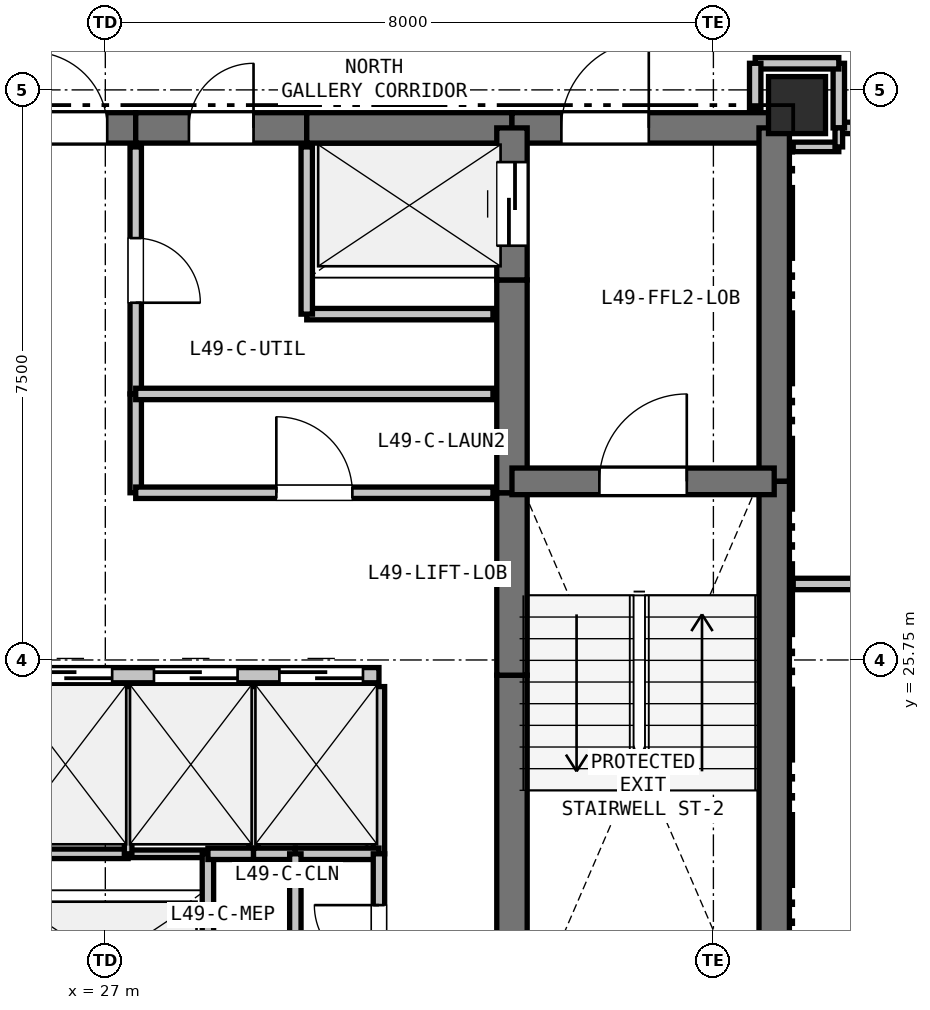
"""IFC4 building model, lengths in metres.
Left out: names, types, materials, properties, quantities, classifications, styles, units other than length and angle.
Written with IfcOpenShell. Run it as: python <this file> out.ifc"""

import sys

from ifc_helpers import new_model, si_unit, direction, frame, frame_2d, origin, origin_2d, place, context, subcontext, project, spatial, rectangle, extrude, element, fill, save


model = new_model("IFC4")
c1 = context("Model", 3, precision=1e-05, world=origin(), true_north=direction((0.0, 1.0)))
c2 = subcontext(c1, "Body", "Model", "MODEL_VIEW")
j1 = project(units=[si_unit("LENGTHUNIT", "METRE"), si_unit("PLANEANGLEUNIT", "RADIAN")], contexts=[c1])
p1 = place(None, origin())
s1 = spatial("IfcSite", under=j1, at=p1, CompositionType="ELEMENT")
p2 = place(p1, origin())
s2 = spatial("IfcBuilding", under=s1, at=p2, CompositionType="ELEMENT")
p3 = place(p2, frame((0.0, 0.0, 178.8)))
s3 = spatial("IfcBuildingStorey", under=s2, at=p3, CompositionType="ELEMENT", Elevation=178.8)
p4 = place(p3, frame((36.1, 33.05, 0.0), z_axis=(0.0, 0.0, 1.0), x_axis=(1.0, 0.0, 0.0)))
e1 = element("IfcColumn", 1, at=p4, inside=s3, PredefinedType="COLUMN", context=c2, shape_type="SweptSolid", body=[
    extrude(rectangle(XDim=0.75, YDim=0.75, at=origin_2d()), origin(), (0.0, 0.0, 1.0), 3.3),
])
p5 = place(p3, frame((25.65, 32.75, 0.0), z_axis=(0.0, 0.0, 1.0), x_axis=(1.0, 0.0, 0.0)))
e2 = element("IfcWall", 2, at=p5, inside=s3, PredefinedType="SHEAR", context=c2, shape_type="SweptSolid", body=[
    extrude(rectangle(XDim=1.75, YDim=0.4, at=frame_2d((0.875, 0.0))), origin(), (0.0, 0.0, 1.0), 3.07),
])
p6 = place(p5, frame((0.375, 0.0, 0.0)))
e3 = element("IfcOpeningElement", 3, at=p6, cuts=e2, PredefinedType="OPENING", context=c2, shape_type="SweptSolid", body=[
    extrude(rectangle(XDim=1.0, YDim=2.15, at=frame_2d((0.5, 1.075))), frame((0.0, 0.21, 0.0), z_axis=(0.0, -1.0, 0.0), x_axis=(1.0, 0.0, 0.0)), (0.0, 0.0, 1.0), 0.42),
])
p7 = place(p3, frame((27.4, 32.75, 0.0), z_axis=(0.0, 0.0, 1.0), x_axis=(1.0, 0.0, 0.0)))
e4 = element("IfcWall", 4, at=p7, inside=s3, PredefinedType="SHEAR", context=c2, shape_type="SweptSolid", body=[
    extrude(rectangle(XDim=2.25, YDim=0.4, at=frame_2d((1.125, 0.0))), origin(), (0.0, 0.0, 1.0), 3.07),
])
p8 = place(p7, frame((0.7, 0.0, 0.0)))
e5 = element("IfcOpeningElement", 5, at=p8, cuts=e4, PredefinedType="OPENING", context=c2, shape_type="SweptSolid", body=[
    extrude(rectangle(XDim=0.85, YDim=2.1, at=frame_2d((0.425, 1.05))), frame((0.0, 0.21, 0.0), z_axis=(0.0, -1.0, 0.0), x_axis=(1.0, 0.0, 0.0)), (0.0, 0.0, 1.0), 0.42),
])
p9 = place(p3, frame((29.65, 32.75, 0.0), z_axis=(0.0, 0.0, 1.0), x_axis=(1.0, 0.0, 0.0)))
e6 = element("IfcWall", 6, at=p9, inside=s3, PredefinedType="SHEAR", context=c2, shape_type="SweptSolid", body=[
    extrude(rectangle(XDim=2.7, YDim=0.4, at=frame_2d((1.35, 0.0))), origin(), (0.0, 0.0, 1.0), 3.07),
])
p10 = place(p3, frame((32.35, 32.75, 0.0), z_axis=(0.0, 0.0, 1.0), x_axis=(1.0, 0.0, 0.0)))
e7 = element("IfcWall", 7, at=p10, inside=s3, PredefinedType="SHEAR", context=c2, shape_type="SweptSolid", body=[
    extrude(rectangle(XDim=3.45, YDim=0.4, at=frame_2d((1.725, 0.0))), origin(), (0.0, 0.0, 1.0), 3.07),
])
p11 = place(p10, frame((0.65, 0.0, 0.0)))
e8 = element("IfcOpeningElement", 8, at=p11, cuts=e7, PredefinedType="OPENING", context=c2, shape_type="SweptSolid", body=[
    extrude(rectangle(XDim=1.15, YDim=2.15, at=frame_2d((0.575, 1.075))), frame((0.0, 0.21, 0.0), z_axis=(0.0, -1.0, 0.0), x_axis=(1.0, 0.0, 0.0)), (0.0, 0.0, 1.0), 0.42),
])
p12 = place(p3, frame((35.8, 32.75, 0.0), z_axis=(0.0, 0.0, 1.0), x_axis=(0.0, -1.0, 0.0)))
e9 = element("IfcWall", 9, at=p12, inside=s3, PredefinedType="SHEAR", context=c2, shape_type="SweptSolid", body=[
    extrude(rectangle(XDim=4.65, YDim=0.4, at=frame_2d((2.325, 0.0))), origin(), (0.0, 0.0, 1.0), 3.07),
])
p13 = place(p3, frame((35.8, 28.1, 0.0), z_axis=(0.0, 0.0, 1.0), x_axis=(0.0, -1.0, 0.0)))
e10 = element("IfcWall", 10, at=p13, inside=s3, PredefinedType="SHEAR", context=c2, shape_type="SweptSolid", body=[
    extrude(rectangle(XDim=7.35, YDim=0.4, at=frame_2d((3.675, 0.0))), origin(), (0.0, 0.0, 1.0), 3.07),
])
p14 = place(p3, frame((32.35, 20.75, 0.0), z_axis=(0.0, 0.0, 1.0), x_axis=(0.0, 1.0, 0.0)))
e11 = element("IfcWall", 11, at=p14, inside=s3, PredefinedType="SHEAR", context=c2, shape_type="SweptSolid", body=[
    extrude(rectangle(XDim=4.8, YDim=0.4, at=frame_2d((2.4, 0.0))), origin(), (0.0, 0.0, 1.0), 3.07),
])
p15 = place(p3, frame((32.35, 25.55, 0.0), z_axis=(0.0, 0.0, 1.0), x_axis=(0.0, 1.0, 0.0)))
e12 = element("IfcWall", 12, at=p15, inside=s3, PredefinedType="SHEAR", context=c2, shape_type="SweptSolid", body=[
    extrude(rectangle(XDim=2.4, YDim=0.4, at=frame_2d((1.2, 0.0))), origin(), (0.0, 0.0, 1.0), 3.07),
])
p16 = place(p3, frame((32.35, 27.95, 0.0), z_axis=(0.0, 0.0, 1.0), x_axis=(0.0, 1.0, 0.0)))
e13 = element("IfcWall", 13, at=p16, inside=s3, PredefinedType="SHEAR", context=c2, shape_type="SweptSolid", body=[
    extrude(rectangle(XDim=2.8, YDim=0.4, at=frame_2d((1.4, 0.0))), origin(), (0.0, 0.0, 1.0), 3.07),
])
p17 = place(p3, frame((32.35, 30.75, 0.0), z_axis=(0.0, 0.0, 1.0), x_axis=(0.0, 1.0, 0.0)))
e14 = element("IfcWall", 14, at=p17, inside=s3, PredefinedType="SHEAR", context=c2, shape_type="SweptSolid", body=[
    extrude(rectangle(XDim=2.0, YDim=0.4, at=frame_2d((1.0, 0.0))), origin(), (0.0, 0.0, 1.0), 3.07),
])
p18 = place(p17, frame((0.45, 0.0, 0.0)))
e15 = element("IfcOpeningElement", 15, at=p18, cuts=e14, PredefinedType="OPENING", context=c2, shape_type="SweptSolid", body=[
    extrude(rectangle(XDim=1.1, YDim=2.15, at=frame_2d((0.55, 1.075))), frame((0.0, 0.21, 0.0), z_axis=(0.0, -1.0, 0.0), x_axis=(1.0, 0.0, 0.0)), (0.0, 0.0, 1.0), 0.42),
])
p19 = place(p3, frame((32.35, 28.1, 0.0), z_axis=(0.0, 0.0, 1.0), x_axis=(1.0, 0.0, 0.0)))
e16 = element("IfcWall", 16, at=p19, inside=s3, PredefinedType="SHEAR", context=c2, shape_type="SweptSolid", body=[
    extrude(rectangle(XDim=3.45, YDim=0.35, at=frame_2d((1.725, 0.0))), origin(), (0.0, 0.0, 1.0), 3.07),
])
p20 = place(p19, frame((1.15, 0.0, 0.0)))
e17 = element("IfcOpeningElement", 17, at=p20, cuts=e16, PredefinedType="OPENING", context=c2, shape_type="SweptSolid", body=[
    extrude(rectangle(XDim=1.15, YDim=2.15, at=frame_2d((0.575, 1.075))), frame((0.0, 0.185, 0.0), z_axis=(0.0, -1.0, 0.0), x_axis=(1.0, 0.0, 0.0)), (0.0, 0.0, 1.0), 0.37),
])
p21 = place(p3, frame((25.65, 25.55, 0.0), z_axis=(0.0, 0.0, 1.0), x_axis=(1.0, 0.0, 0.0)))
e18 = element("IfcWall", 18, at=p21, inside=s3, PredefinedType="PARTITIONING", context=c2, shape_type="SweptSolid", body=[
    extrude(rectangle(XDim=4.95, YDim=0.2, at=frame_2d((2.475, 0.0))), origin(), (0.0, 0.0, 1.0), 3.07),
])
p22 = place(p21, frame((0.34, 0.0, 0.0)))
e19 = element("IfcOpeningElement", 19, at=p22, cuts=e18, PredefinedType="OPENING", context=c2, shape_type="SweptSolid", body=[
    extrude(rectangle(XDim=1.1, YDim=2.15, at=frame_2d((0.55, 1.075))), frame((0.0, 0.11, 0.0), z_axis=(0.0, -1.0, 0.0), x_axis=(1.0, 0.0, 0.0)), (0.0, 0.0, 1.0), 0.22),
])
p23 = place(p21, frame((1.99, 0.0, 0.0)))
e20 = element("IfcOpeningElement", 20, at=p23, cuts=e18, PredefinedType="OPENING", context=c2, shape_type="SweptSolid", body=[
    extrude(rectangle(XDim=1.1, YDim=2.15, at=frame_2d((0.55, 1.075))), frame((0.0, 0.11, 0.0), z_axis=(0.0, -1.0, 0.0), x_axis=(1.0, 0.0, 0.0)), (0.0, 0.0, 1.0), 0.22),
])
p24 = place(p21, frame((3.64, 0.0, 0.0)))
e21 = element("IfcOpeningElement", 21, at=p24, cuts=e18, PredefinedType="OPENING", context=c2, shape_type="SweptSolid", body=[
    extrude(rectangle(XDim=1.1, YDim=2.15, at=frame_2d((0.55, 1.075))), frame((0.0, 0.11, 0.0), z_axis=(0.0, -1.0, 0.0), x_axis=(1.0, 0.0, 0.0)), (0.0, 0.0, 1.0), 0.22),
])
p25 = place(p3, frame((25.9, 23.2, 0.0), z_axis=(0.0, 0.0, 1.0), x_axis=(1.0, 0.0, 0.0)))
e22 = element("IfcWall", 22, at=p25, inside=s3, PredefinedType="PARTITIONING", context=c2, shape_type="SweptSolid", body=[
    extrude(rectangle(XDim=1.4, YDim=0.125, at=frame_2d((0.7, 0.0))), origin(), (0.0, 0.0, 1.0), 3.07),
])
p26 = place(p3, frame((27.3, 23.2, 0.0), z_axis=(0.0, 0.0, 1.0), x_axis=(1.0, 0.0, 0.0)))
e23 = element("IfcWall", 23, at=p26, inside=s3, PredefinedType="PARTITIONING", context=c2, shape_type="SweptSolid", body=[
    extrude(rectangle(XDim=1.05, YDim=0.1, at=frame_2d((0.525, 0.0))), origin(), (0.0, 0.0, 1.0), 3.07),
])
p27 = place(p3, frame((28.35, 23.2, 0.0), z_axis=(0.0, 0.0, 1.0), x_axis=(0.0, -1.0, 0.0)))
e24 = element("IfcWall", 24, at=p27, inside=s3, PredefinedType="PARTITIONING", context=c2, shape_type="SweptSolid", body=[
    extrude(rectangle(XDim=2.2, YDim=0.15, at=frame_2d((1.1, 0.0))), origin(), (0.0, 0.0, 1.0), 3.07),
])
p28 = place(p3, frame((32.1, 30.3, 0.0), z_axis=(0.0, 0.0, 1.0), x_axis=(-1.0, 0.0, 0.0)))
e25 = element("IfcWall", 25, at=p28, inside=s3, PredefinedType="PARTITIONING", context=c2, shape_type="SweptSolid", body=[
    extrude(rectangle(XDim=2.45, YDim=0.15, at=frame_2d((1.225, 0.0))), origin(), (0.0, 0.0, 1.0), 3.07),
])
p29 = place(p3, frame((29.65, 30.3, 0.0), z_axis=(0.0, 0.0, 1.0), x_axis=(0.0, 1.0, 0.0)))
e26 = element("IfcWall", 26, at=p29, inside=s3, PredefinedType="PARTITIONING", context=c2, shape_type="SweptSolid", body=[
    extrude(rectangle(XDim=2.2, YDim=0.15, at=frame_2d((1.1, 0.0))), origin(), (0.0, 0.0, 1.0), 3.07),
])
p30 = place(p3, frame((27.3, 25.4, 0.0), z_axis=(0.0, 0.0, 1.0), x_axis=(0.0, -1.0, 0.0)))
e27 = element("IfcWall", 27, at=p30, inside=s3, PredefinedType="PARTITIONING", context=c2, shape_type="SweptSolid", body=[
    extrude(rectangle(XDim=2.2, YDim=0.1, at=frame_2d((1.1, 0.0))), origin(), (0.0, 0.0, 1.0), 3.07),
])
p31 = place(p3, frame((28.95, 25.4, 0.0), z_axis=(0.0, 0.0, 1.0), x_axis=(0.0, -1.0, 0.0)))
e28 = element("IfcWall", 28, at=p31, inside=s3, PredefinedType="PARTITIONING", context=c2, shape_type="SweptSolid", body=[
    extrude(rectangle(XDim=2.2, YDim=0.125, at=frame_2d((1.1, 0.0))), origin(), (0.0, 0.0, 1.0), 3.07),
])
p32 = place(p3, frame((28.95, 23.2, 0.0), z_axis=(0.0, 0.0, 1.0), x_axis=(-1.0, 0.0, 0.0)))
e29 = element("IfcWall", 29, at=p32, inside=s3, PredefinedType="PARTITIONING", context=c2, shape_type="SweptSolid", body=[
    extrude(rectangle(XDim=0.6, YDim=0.15, at=frame_2d((0.3, 0.0))), origin(), (0.0, 0.0, 1.0), 3.07),
])
p33 = place(p3, frame((30.6, 25.4, 0.0), z_axis=(0.0, 0.0, 1.0), x_axis=(0.0, -1.0, 0.0)))
e30 = element("IfcWall", 30, at=p33, inside=s3, PredefinedType="PARTITIONING", context=c2, shape_type="SweptSolid", body=[
    extrude(rectangle(XDim=2.2, YDim=0.15, at=frame_2d((1.1, 0.0))), origin(), (0.0, 0.0, 1.0), 3.07),
])
p34 = place(p3, frame((30.6, 23.2, 0.0), z_axis=(0.0, 0.0, 1.0), x_axis=(-1.0, 0.0, 0.0)))
e31 = element("IfcWall", 31, at=p34, inside=s3, PredefinedType="PARTITIONING", context=c2, shape_type="SweptSolid", body=[
    extrude(rectangle(XDim=1.1, YDim=0.15, at=frame_2d((0.55, 0.0))), origin(), (0.0, 0.0, 1.0), 3.07),
])
p35 = place(p3, frame((29.5, 23.2, 0.0), z_axis=(0.0, 0.0, 1.0), x_axis=(-1.0, 0.0, 0.0)))
e32 = element("IfcWall", 32, at=p35, inside=s3, PredefinedType="PARTITIONING", context=c2, shape_type="SweptSolid", body=[
    extrude(rectangle(XDim=0.55, YDim=0.15, at=frame_2d((0.275, 0.0))), origin(), (0.0, 0.0, 1.0), 3.07),
])
p36 = place(p3, frame((30.6, 21.0, 0.0), z_axis=(0.0, 0.0, 1.0), x_axis=(0.0, 1.0, 0.0)))
e33 = element("IfcWall", 33, at=p36, inside=s3, PredefinedType="PARTITIONING", context=c2, shape_type="SweptSolid", body=[
    extrude(rectangle(XDim=2.2, YDim=0.15, at=frame_2d((1.1, 0.0))), origin(), (0.0, 0.0, 1.0), 3.07),
])
p37 = place(p36, frame((0.675, 0.0, 0.0)))
e34 = element("IfcOpeningElement", 34, at=p37, cuts=e33, PredefinedType="OPENING", context=c2, shape_type="SweptSolid", body=[
    extrude(rectangle(XDim=0.85, YDim=2.1, at=frame_2d((0.425, 1.05))), frame((0.0, 0.085, 0.0), z_axis=(0.0, -1.0, 0.0), x_axis=(1.0, 0.0, 0.0)), (0.0, 0.0, 1.0), 0.17),
])
p38 = place(p3, frame((27.4, 32.5, 0.0), z_axis=(0.0, 0.0, 1.0), x_axis=(0.0, -1.0, 0.0)))
e35 = element("IfcWall", 35, at=p38, inside=s3, PredefinedType="PARTITIONING", context=c2, shape_type="SweptSolid", body=[
    extrude(rectangle(XDim=3.25, YDim=0.15, at=frame_2d((1.625, 0.0))), origin(), (0.0, 0.0, 1.0), 3.07),
])
p39 = place(p38, frame((1.2, 0.0, 0.0)))
e36 = element("IfcOpeningElement", 36, at=p39, cuts=e35, PredefinedType="OPENING", context=c2, shape_type="SweptSolid", body=[
    extrude(rectangle(XDim=0.85, YDim=2.1, at=frame_2d((0.425, 1.05))), frame((0.0, 0.085, 0.0), z_axis=(0.0, -1.0, 0.0), x_axis=(1.0, 0.0, 0.0)), (0.0, 0.0, 1.0), 0.17),
])
p40 = place(p3, frame((27.4, 29.25, 0.0), z_axis=(0.0, 0.0, 1.0), x_axis=(0.0, -1.0, 0.0)))
e37 = element("IfcWall", 37, at=p40, inside=s3, PredefinedType="PARTITIONING", context=c2, shape_type="SweptSolid", body=[
    extrude(rectangle(XDim=1.3, YDim=0.15, at=frame_2d((0.65, 0.0))), origin(), (0.0, 0.0, 1.0), 3.07),
])
p41 = place(p3, frame((27.4, 27.95, 0.0), z_axis=(0.0, 0.0, 1.0), x_axis=(1.0, 0.0, 0.0)))
e38 = element("IfcWall", 38, at=p41, inside=s3, PredefinedType="PARTITIONING", context=c2, shape_type="SweptSolid", body=[
    extrude(rectangle(XDim=4.7, YDim=0.15, at=frame_2d((2.35, 0.0))), origin(), (0.0, 0.0, 1.0), 3.07),
])
p42 = place(p41, frame((1.85, 0.0, 0.0)))
e39 = element("IfcOpeningElement", 39, at=p42, cuts=e38, PredefinedType="OPENING", context=c2, shape_type="SweptSolid", body=[
    extrude(rectangle(XDim=1.0, YDim=2.15, at=frame_2d((0.5, 1.075))), frame((0.0, 0.085, 0.0), z_axis=(0.0, -1.0, 0.0), x_axis=(1.0, 0.0, 0.0)), (0.0, 0.0, 1.0), 0.17),
])
p43 = place(p3, frame((39.2, 32.75, 0.0), z_axis=(0.0, 0.0, 1.0), x_axis=(-1.0, 0.0, 0.0)))
e40 = element("IfcWall", 40, at=p43, inside=s3, PredefinedType="PARTITIONING", context=c2, shape_type="SweptSolid", body=[
    extrude(rectangle(XDim=2.55, YDim=0.15, at=frame_2d((1.275, 0.0))), origin(), (0.0, 0.0, 1.0), 3.07),
])
p44 = place(p43, frame((0.775, 0.0, 0.0)))
e41 = element("IfcOpeningElement", 41, at=p44, cuts=e40, PredefinedType="OPENING", context=c2, shape_type="SweptSolid", body=[
    extrude(rectangle(XDim=1.0, YDim=2.15, at=frame_2d((0.5, 1.075))), frame((0.0, 0.085, 0.0), z_axis=(0.0, -1.0, 0.0), x_axis=(1.0, 0.0, 0.0)), (0.0, 0.0, 1.0), 0.17),
])
p45 = place(p3, frame((36.65, 32.75, 0.0), z_axis=(0.0, 0.0, 1.0), x_axis=(0.0, 1.0, 0.0)))
e42 = element("IfcWall", 42, at=p45, inside=s3, PredefinedType="PARTITIONING", context=c2, shape_type="SweptSolid", body=[
    extrude(rectangle(XDim=0.85, YDim=0.15, at=frame_2d((0.425, 0.0))), origin(), (0.0, 0.0, 1.0), 2.518),
])
p46 = place(p3, frame((36.65, 33.6, 0.0), z_axis=(0.0, 0.0, 1.0), x_axis=(-1.0, 0.0, 0.0)))
e43 = element("IfcWall", 43, at=p46, inside=s3, PredefinedType="PARTITIONING", context=c2, shape_type="SweptSolid", body=[
    extrude(rectangle(XDim=1.1, YDim=0.15, at=frame_2d((0.55, 0.0))), origin(), (0.0, 0.0, 1.0), 2.518),
])
p47 = place(p3, frame((35.55, 33.6, 0.0), z_axis=(0.0, 0.0, 1.0), x_axis=(0.0, -1.0, 0.0)))
e44 = element("IfcWall", 44, at=p47, inside=s3, PredefinedType="PARTITIONING", context=c2, shape_type="SweptSolid", body=[
    extrude(rectangle(XDim=0.6, YDim=0.15, at=frame_2d((0.3, 0.0))), origin(), (0.0, 0.0, 1.0), 2.595),
])
p48 = place(p3, frame((32.1, 29.25, 0.0), z_axis=(0.0, 0.0, 1.0), x_axis=(-1.0, 0.0, 0.0)))
e45 = element("IfcWall", 45, at=p48, inside=s3, PredefinedType="PARTITIONING", context=c2, shape_type="SweptSolid", body=[
    extrude(rectangle(XDim=4.7, YDim=0.15, at=frame_2d((2.35, 0.0))), origin(), (0.0, 0.0, 1.0), 3.07),
])
p49 = place(p3, frame((29.5, 23.2, 0.0), z_axis=(0.0, 0.0, 1.0), x_axis=(0.0, -1.0, 0.0)))
e46 = element("IfcWall", 46, at=p49, inside=s3, PredefinedType="PARTITIONING", context=c2, shape_type="SweptSolid", body=[
    extrude(rectangle(XDim=2.2, YDim=0.15, at=frame_2d((1.1, 0.0))), origin(), (0.0, 0.0, 1.0), 3.07),
])
p50 = place(p3, frame((36.05, 32.5, 0.0), z_axis=(0.0, 0.0, 1.0), x_axis=(1.0, 0.0, 0.0)))
e47 = element("IfcWall", 47, at=p50, inside=s3, PredefinedType="PARTITIONING", context=c2, shape_type="SweptSolid", body=[
    extrude(rectangle(XDim=0.6, YDim=0.125, at=frame_2d((0.3, 0.0))), origin(), (0.0, 0.0, 1.0), 2.595),
])
p51 = place(p3, frame((36.65, 32.5, 0.0), z_axis=(0.0, 0.0, 1.0), x_axis=(0.0, 1.0, 0.0)))
e48 = element("IfcWall", 48, at=p51, inside=s3, PredefinedType="PARTITIONING", context=c2, shape_type="SweptSolid", body=[
    extrude(rectangle(XDim=0.25, YDim=0.1, at=frame_2d((0.125, 0.0))), origin(), (0.0, 0.0, 1.0), 3.07),
])
p52 = place(p3, frame((40.55, 26.75, 0.0), z_axis=(0.0, 0.0, 1.0), x_axis=(-1.0, 0.0, 0.0)))
e49 = element("IfcWall", 49, at=p52, inside=s3, PredefinedType="PARTITIONING", context=c2, shape_type="SweptSolid", body=[
    extrude(rectangle(XDim=4.5, YDim=0.15, at=frame_2d((2.25, 0.0))), origin(), (0.0, 0.0, 1.0), 2.365),
])
p53 = place(p22, origin())
e50 = element("IfcDoor", 50, at=p53, inside=s3, OperationType="SLIDING_TO_LEFT", PredefinedType="DOOR", context=c2, shape_type="SweptSolid", body=[
    extrude(rectangle(XDim=1.1, YDim=2.15, at=frame_2d((0.55, 1.075))), frame((0.0, 0.025, 0.0), z_axis=(0.0, -1.0, 0.0), x_axis=(1.0, 0.0, 0.0)), (0.0, 0.0, 1.0), 0.05),
])
fill(e19, e50)
p54 = place(p23, origin())
e51 = element("IfcDoor", 51, at=p54, inside=s3, OperationType="SLIDING_TO_LEFT", PredefinedType="DOOR", context=c2, shape_type="SweptSolid", body=[
    extrude(rectangle(XDim=1.1, YDim=2.15, at=frame_2d((0.55, 1.075))), frame((0.0, 0.025, 0.0), z_axis=(0.0, -1.0, 0.0), x_axis=(1.0, 0.0, 0.0)), (0.0, 0.0, 1.0), 0.05),
])
fill(e20, e51)
p55 = place(p24, origin())
e52 = element("IfcDoor", 52, at=p55, inside=s3, OperationType="SLIDING_TO_LEFT", PredefinedType="DOOR", context=c2, shape_type="SweptSolid", body=[
    extrude(rectangle(XDim=1.1, YDim=2.15, at=frame_2d((0.55, 1.075))), frame((0.0, 0.025, 0.0), z_axis=(0.0, -1.0, 0.0), x_axis=(1.0, 0.0, 0.0)), (0.0, 0.0, 1.0), 0.05),
])
fill(e21, e52)
p56 = place(p6, origin())
e53 = element("IfcDoor", 53, at=p56, inside=s3, OperationType="SINGLE_SWING_LEFT", PredefinedType="DOOR", context=c2, shape_type="SweptSolid", body=[
    extrude(rectangle(XDim=1.0, YDim=2.15, at=frame_2d((0.5, 1.075))), frame((0.0, 0.025, 0.0), z_axis=(0.0, -1.0, 0.0), x_axis=(1.0, 0.0, 0.0)), (0.0, 0.0, 1.0), 0.05),
])
fill(e3, e53)
p57 = place(p18, origin())
e54 = element("IfcDoor", 54, at=p57, inside=s3, OperationType="SLIDING_TO_LEFT", PredefinedType="DOOR", context=c2, shape_type="SweptSolid", body=[
    extrude(rectangle(XDim=1.1, YDim=2.15, at=frame_2d((0.55, 1.075))), frame((0.0, 0.025, 0.0), z_axis=(0.0, -1.0, 0.0), x_axis=(1.0, 0.0, 0.0)), (0.0, 0.0, 1.0), 0.05),
])
fill(e15, e54)
p58 = place(p20, origin())
e55 = element("IfcDoor", 55, at=p58, inside=s3, OperationType="SINGLE_SWING_RIGHT", PredefinedType="DOOR", context=c2, shape_type="SweptSolid", body=[
    extrude(rectangle(XDim=1.15, YDim=2.15, at=frame_2d((0.575, 1.075))), frame((0.0, 0.025, 0.0), z_axis=(0.0, -1.0, 0.0), x_axis=(1.0, 0.0, 0.0)), (0.0, 0.0, 1.0), 0.05),
])
fill(e17, e55)
p59 = place(p11, origin())
e56 = element("IfcDoor", 56, at=p59, inside=s3, OperationType="SINGLE_SWING_RIGHT", PredefinedType="DOOR", context=c2, shape_type="SweptSolid", body=[
    extrude(rectangle(XDim=1.15, YDim=2.15, at=frame_2d((0.575, 1.075))), frame((0.0, 0.025, 0.0), z_axis=(0.0, -1.0, 0.0), x_axis=(1.0, 0.0, 0.0)), (0.0, 0.0, 1.0), 0.05),
])
fill(e8, e56)
p60 = place(p39, origin())
e57 = element("IfcDoor", 57, at=p60, inside=s3, OperationType="SINGLE_SWING_RIGHT", PredefinedType="DOOR", context=c2, shape_type="SweptSolid", body=[
    extrude(rectangle(XDim=0.85, YDim=2.1, at=frame_2d((0.425, 1.05))), frame((0.0, 0.025, 0.0), z_axis=(0.0, -1.0, 0.0), x_axis=(1.0, 0.0, 0.0)), (0.0, 0.0, 1.0), 0.05),
])
fill(e36, e57)
p61 = place(p42, origin())
e58 = element("IfcDoor", 58, at=p61, inside=s3, OperationType="SINGLE_SWING_LEFT", PredefinedType="DOOR", context=c2, shape_type="SweptSolid", body=[
    extrude(rectangle(XDim=1.0, YDim=2.15, at=frame_2d((0.5, 1.075))), frame((0.0, 0.025, 0.0), z_axis=(0.0, -1.0, 0.0), x_axis=(1.0, 0.0, 0.0)), (0.0, 0.0, 1.0), 0.05),
])
fill(e39, e58)
p62 = place(p37, origin())
e59 = element("IfcDoor", 59, at=p62, inside=s3, OperationType="SINGLE_SWING_RIGHT", PredefinedType="DOOR", context=c2, shape_type="SweptSolid", body=[
    extrude(rectangle(XDim=0.85, YDim=2.1, at=frame_2d((0.425, 1.05))), frame((0.0, 0.025, 0.0), z_axis=(0.0, -1.0, 0.0), x_axis=(1.0, 0.0, 0.0)), (0.0, 0.0, 1.0), 0.05),
])
fill(e34, e59)
p63 = place(p8, origin())
e60 = element("IfcDoor", 60, at=p63, inside=s3, OperationType="SINGLE_SWING_RIGHT", PredefinedType="DOOR", context=c2, shape_type="SweptSolid", body=[
    extrude(rectangle(XDim=0.85, YDim=2.1, at=frame_2d((0.425, 1.05))), frame((0.0, 0.025, 0.0), z_axis=(0.0, -1.0, 0.0), x_axis=(1.0, 0.0, 0.0)), (0.0, 0.0, 1.0), 0.05),
])
fill(e5, e60)
save(model, sys.argv[1])
